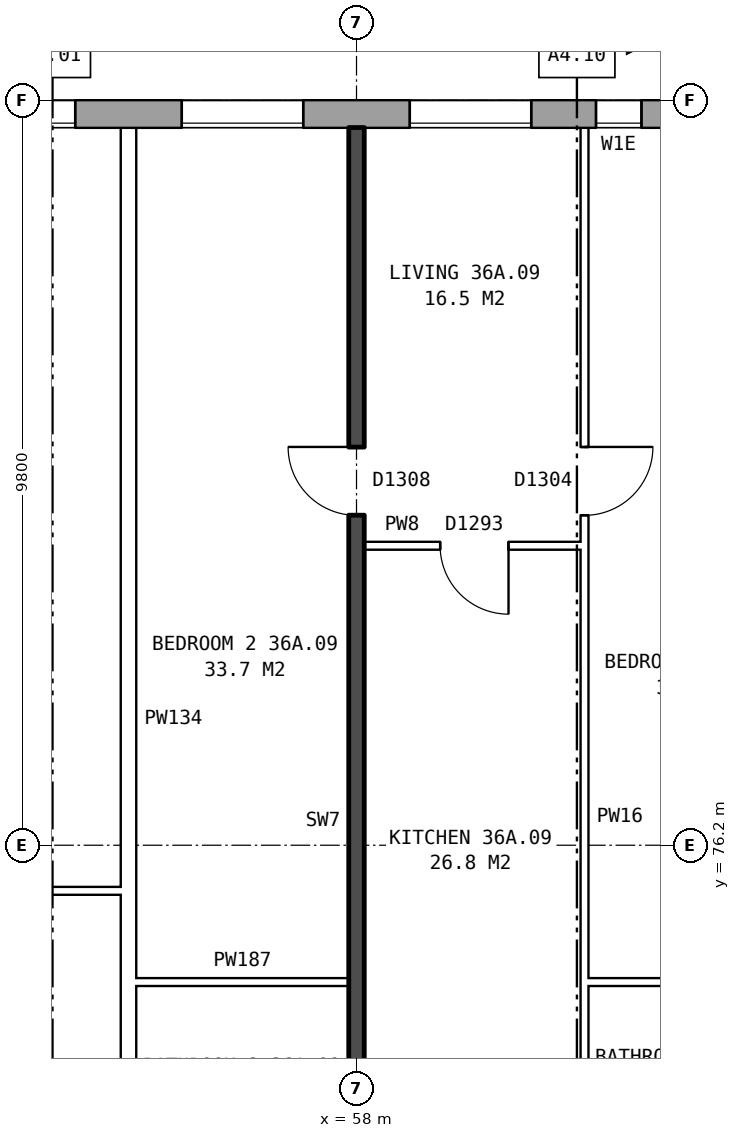
"""IFC4 building model, lengths in metres.
Left out: names, types, materials, properties, quantities, classifications, styles, units other than length and angle.
Written with IfcOpenShell. Run it as: python <this file> out.ifc"""

import sys

from ifc_helpers import new_model, si_unit, direction, frame, frame_2d, origin, place, context, subcontext, project, spatial, rectangle, extrude, element, fill, save


model = new_model("IFC4")
c1 = context("Model", 3, precision=1e-05, world=origin(), true_north=direction((0.0, 1.0)))
c2 = subcontext(c1, "Body", "Model", "MODEL_VIEW")
j1 = project(units=[si_unit("LENGTHUNIT", "METRE"), si_unit("PLANEANGLEUNIT", "RADIAN")], contexts=[c1])
p1 = place(None, origin())
s1 = spatial("IfcSite", under=j1, at=p1, CompositionType="ELEMENT")
p2 = place(p1, origin())
s2 = spatial("IfcBuilding", under=s1, at=p2, CompositionType="ELEMENT")
p3 = place(p2, frame((0.0, 0.0, 129.9)))
s3 = spatial("IfcBuildingStorey", under=s2, at=p3, CompositionType="ELEMENT", Elevation=129.9)
p4 = place(p3, frame((72.925, 85.82, 0.0), z_axis=(0.0, 0.0, 1.0), x_axis=(-1.0, 0.0, 0.0)))
e1 = element("IfcWall", 1, at=p4, inside=s3, PredefinedType="STANDARD", context=c2, shape_type="SweptSolid", body=[
    extrude(rectangle(XDim=43.101, YDim=0.36, at=frame_2d((21.55, 0.0))), origin(), (0.0, 0.0, 1.0), 2.85),
])
p5 = place(p4, frame((0.625, 0.0, 0.8)))
e2 = element("IfcOpeningElement", 2, at=p5, cuts=e1, PredefinedType="OPENING", context=c2, shape_type="SweptSolid", body=[
    extrude(rectangle(XDim=1.6, YDim=1.8, at=frame_2d((0.8, 0.9))), frame((0.0, 0.19, 0.0), z_axis=(0.0, -1.0, 0.0), x_axis=(1.0, 0.0, 0.0)), (0.0, 0.0, 1.0), 0.38),
])
p6 = place(p4, frame((3.625, 0.0, 0.8)))
e3 = element("IfcOpeningElement", 3, at=p6, cuts=e1, PredefinedType="OPENING", context=c2, shape_type="SweptSolid", body=[
    extrude(rectangle(XDim=1.6, YDim=1.8, at=frame_2d((0.8, 0.9))), frame((0.0, 0.19, 0.0), z_axis=(0.0, -1.0, 0.0), x_axis=(1.0, 0.0, 0.0)), (0.0, 0.0, 1.0), 0.38),
])
p7 = place(p4, frame((6.625, 0.0, 0.8)))
e4 = element("IfcOpeningElement", 4, at=p7, cuts=e1, PredefinedType="OPENING", context=c2, shape_type="SweptSolid", body=[
    extrude(rectangle(XDim=1.6, YDim=1.8, at=frame_2d((0.8, 0.9))), frame((0.0, 0.19, 0.0), z_axis=(0.0, -1.0, 0.0), x_axis=(1.0, 0.0, 0.0)), (0.0, 0.0, 1.0), 0.38),
])
p8 = place(p4, frame((10.175, 0.0, 0.15)))
e5 = element("IfcOpeningElement", 5, at=p8, cuts=e1, PredefinedType="OPENING", context=c2, shape_type="SweptSolid", body=[
    extrude(rectangle(XDim=0.6, YDim=0.9, at=frame_2d((0.3, 0.45))), frame((0.0, 0.19, 0.0), z_axis=(0.0, -1.0, 0.0), x_axis=(1.0, 0.0, 0.0)), (0.0, 0.0, 1.0), 0.38),
])
p9 = place(p4, frame((12.625, 0.0, 0.8)))
e6 = element("IfcOpeningElement", 6, at=p9, cuts=e1, PredefinedType="OPENING", context=c2, shape_type="SweptSolid", body=[
    extrude(rectangle(XDim=1.6, YDim=1.8, at=frame_2d((0.8, 0.9))), frame((0.0, 0.19, 0.0), z_axis=(0.0, -1.0, 0.0), x_axis=(1.0, 0.0, 0.0)), (0.0, 0.0, 1.0), 0.38),
])
p10 = place(p4, frame((15.625, 0.0, 0.8)))
e7 = element("IfcOpeningElement", 7, at=p10, cuts=e1, PredefinedType="OPENING", context=c2, shape_type="SweptSolid", body=[
    extrude(rectangle(XDim=1.6, YDim=1.8, at=frame_2d((0.8, 0.9))), frame((0.0, 0.19, 0.0), z_axis=(0.0, -1.0, 0.0), x_axis=(1.0, 0.0, 0.0)), (0.0, 0.0, 1.0), 0.38),
])
p11 = place(p4, frame((18.625, 0.0, 0.8)))
e8 = element("IfcOpeningElement", 8, at=p11, cuts=e1, PredefinedType="OPENING", context=c2, shape_type="SweptSolid", body=[
    extrude(rectangle(XDim=1.6, YDim=1.8, at=frame_2d((0.8, 0.9))), frame((0.0, 0.19, 0.0), z_axis=(0.0, -1.0, 0.0), x_axis=(1.0, 0.0, 0.0)), (0.0, 0.0, 1.0), 0.38),
])
p12 = place(p4, frame((21.625, 0.0, 0.8)))
e9 = element("IfcOpeningElement", 9, at=p12, cuts=e1, PredefinedType="OPENING", context=c2, shape_type="SweptSolid", body=[
    extrude(rectangle(XDim=1.6, YDim=1.8, at=frame_2d((0.8, 0.9))), frame((0.0, 0.19, 0.0), z_axis=(0.0, -1.0, 0.0), x_axis=(1.0, 0.0, 0.0)), (0.0, 0.0, 1.0), 0.38),
])
p13 = place(p4, frame((24.625, 0.0, 0.8)))
e10 = element("IfcOpeningElement", 10, at=p13, cuts=e1, PredefinedType="OPENING", context=c2, shape_type="SweptSolid", body=[
    extrude(rectangle(XDim=1.6, YDim=1.8, at=frame_2d((0.8, 0.9))), frame((0.0, 0.19, 0.0), z_axis=(0.0, -1.0, 0.0), x_axis=(1.0, 0.0, 0.0)), (0.0, 0.0, 1.0), 0.38),
])
p14 = place(p4, frame((27.625, 0.0, 0.8)))
e11 = element("IfcOpeningElement", 11, at=p14, cuts=e1, PredefinedType="OPENING", context=c2, shape_type="SweptSolid", body=[
    extrude(rectangle(XDim=1.6, YDim=1.8, at=frame_2d((0.8, 0.9))), frame((0.0, 0.19, 0.0), z_axis=(0.0, -1.0, 0.0), x_axis=(1.0, 0.0, 0.0)), (0.0, 0.0, 1.0), 0.38),
])
p15 = place(p4, frame((29.525, 0.0, 0.8)))
e12 = element("IfcOpeningElement", 12, at=p15, cuts=e1, PredefinedType="OPENING", context=c2, shape_type="SweptSolid", body=[
    extrude(rectangle(XDim=1.6, YDim=1.8, at=frame_2d((0.8, 0.9))), frame((0.0, 0.19, 0.0), z_axis=(0.0, -1.0, 0.0), x_axis=(1.0, 0.0, 0.0)), (0.0, 0.0, 1.0), 0.38),
])
p16 = place(p4, frame((33.375, 0.0, 1.7)))
e13 = element("IfcOpeningElement", 13, at=p16, cuts=e1, PredefinedType="OPENING", context=c2, shape_type="SweptSolid", body=[
    extrude(rectangle(XDim=0.8, YDim=0.9, at=frame_2d((0.4, 0.45))), frame((0.0, 0.19, 0.0), z_axis=(0.0, -1.0, 0.0), x_axis=(1.0, 0.0, 0.0)), (0.0, 0.0, 1.0), 0.38),
])
p17 = place(p4, frame((36.625, 0.0, 0.8)))
e14 = element("IfcOpeningElement", 14, at=p17, cuts=e1, PredefinedType="OPENING", context=c2, shape_type="SweptSolid", body=[
    extrude(rectangle(XDim=1.6, YDim=1.8, at=frame_2d((0.8, 0.9))), frame((0.0, 0.19, 0.0), z_axis=(0.0, -1.0, 0.0), x_axis=(1.0, 0.0, 0.0)), (0.0, 0.0, 1.0), 0.38),
])
p18 = place(p4, frame((39.625, 0.0, 0.8)))
e15 = element("IfcOpeningElement", 15, at=p18, cuts=e1, PredefinedType="OPENING", context=c2, shape_type="SweptSolid", body=[
    extrude(rectangle(XDim=1.6, YDim=1.8, at=frame_2d((0.8, 0.9))), frame((0.0, 0.19, 0.0), z_axis=(0.0, -1.0, 0.0), x_axis=(1.0, 0.0, 0.0)), (0.0, 0.0, 1.0), 0.38),
])
p19 = place(p4, frame((11.175, 0.0, 0.15)))
e16 = element("IfcOpeningElement", 16, at=p19, cuts=e1, PredefinedType="OPENING", context=c2, shape_type="SweptSolid", body=[
    extrude(rectangle(XDim=0.6, YDim=1.8, at=frame_2d((0.3, 0.9))), frame((0.0, 0.19, 0.0), z_axis=(0.0, -1.0, 0.0), x_axis=(1.0, 0.0, 0.0)), (0.0, 0.0, 1.0), 0.38),
])
p20 = place(p4, frame((31.425, 0.0, 0.8)))
e17 = element("IfcOpeningElement", 17, at=p20, cuts=e1, PredefinedType="OPENING", context=c2, shape_type="SweptSolid", body=[
    extrude(rectangle(XDim=0.8, YDim=0.9, at=frame_2d((0.4, 0.45))), frame((0.0, 0.19, 0.0), z_axis=(0.0, -1.0, 0.0), x_axis=(1.0, 0.0, 0.0)), (0.0, 0.0, 1.0), 0.38),
])
p21 = place(p4, frame((34.475, 0.0, 0.8)))
e18 = element("IfcOpeningElement", 18, at=p21, cuts=e1, PredefinedType="OPENING", context=c2, shape_type="SweptSolid", body=[
    extrude(rectangle(XDim=1.6, YDim=1.8, at=frame_2d((0.8, 0.9))), frame((0.0, 0.19, 0.0), z_axis=(0.0, -1.0, 0.0), x_axis=(1.0, 0.0, 0.0)), (0.0, 0.0, 1.0), 0.38),
])
p22 = place(p3, frame((55.1, 74.4, 0.0), z_axis=(0.0, 0.0, 1.0), x_axis=(1.0, 0.0, 0.0)))
e19 = element("IfcWall", 19, at=p22, inside=s3, PredefinedType="PARTITIONING", context=c2, shape_type="SweptSolid", body=[
    extrude(rectangle(XDim=2.8, YDim=0.1, at=frame_2d((1.4, 0.0))), origin(), (0.0, 0.0, 1.0), 2.85),
])
p23 = place(p3, frame((61.0, 74.4, 0.0), z_axis=(0.0, 0.0, 1.0), x_axis=(1.0, 0.0, 0.0)))
e20 = element("IfcWall", 20, at=p23, inside=s3, PredefinedType="PARTITIONING", context=c2, shape_type="SweptSolid", body=[
    extrude(rectangle(XDim=2.64, YDim=0.1, at=frame_2d((1.32, 0.0))), origin(), (0.0, 0.0, 1.0), 2.85),
])
p24 = place(p3, frame((52.1, 75.6, 0.0), z_axis=(0.0, 0.0, 1.0), x_axis=(1.0, 0.0, 0.0)))
e21 = element("IfcWall", 21, at=p24, inside=s3, PredefinedType="PARTITIONING", context=c2, shape_type="SweptSolid", body=[
    extrude(rectangle(XDim=2.8, YDim=0.1, at=frame_2d((1.4, 0.0))), origin(), (0.0, 0.0, 1.0), 2.85),
])
p25 = place(p3, frame((58.1, 80.14, 0.0), z_axis=(0.0, 0.0, 1.0), x_axis=(1.0, 0.0, 0.0)))
e22 = element("IfcWall", 22, at=p25, inside=s3, PredefinedType="PARTITIONING", context=c2, shape_type="SweptSolid", body=[
    extrude(rectangle(XDim=2.9, YDim=0.1, at=frame_2d((1.45, 0.0))), origin(), (0.0, 0.0, 1.0), 2.85),
])
p26 = place(p25, frame((1.0, 0.0, 0.0)))
e23 = element("IfcOpeningElement", 23, at=p26, cuts=e22, PredefinedType="OPENING", context=c2, shape_type="SweptSolid", body=[
    extrude(rectangle(XDim=0.9, YDim=2.1, at=frame_2d((0.45, 1.05))), frame((0.0, 0.06, 0.0), z_axis=(0.0, -1.0, 0.0), x_axis=(1.0, 0.0, 0.0)), (0.0, 0.0, 1.0), 0.12),
])
p27 = place(p3, frame((55.0, 71.3, 0.0), z_axis=(0.0, 0.0, 1.0), x_axis=(0.0, 1.0, 0.0)))
e24 = element("IfcWall", 24, at=p27, inside=s3, PredefinedType="PARTITIONING", context=c2, shape_type="SweptSolid", body=[
    extrude(rectangle(XDim=14.34, YDim=0.2, at=frame_2d((7.17, 0.0))), origin(), (0.0, 0.0, 1.0), 2.85),
])
p28 = place(p3, frame((58.0, 71.2, 0.0), z_axis=(0.0, 0.0, 1.0), x_axis=(0.0, 1.0, 0.0)))
e25 = element("IfcWall", 25, at=p28, inside=s3, PredefinedType="SOLIDWALL", context=c2, shape_type="SweptSolid", body=[
    extrude(rectangle(XDim=14.44, YDim=0.2, at=frame_2d((7.22, 0.0))), origin(), (0.0, 0.0, 1.0), 2.85),
])
p29 = place(p28, frame((9.34, 0.0, 0.0)))
e26 = element("IfcOpeningElement", 26, at=p29, cuts=e25, PredefinedType="OPENING", context=c2, shape_type="SweptSolid", body=[
    extrude(rectangle(XDim=0.9, YDim=2.1, at=frame_2d((0.45, 1.05))), frame((0.0, 0.11, 0.0), z_axis=(0.0, -1.0, 0.0), x_axis=(1.0, 0.0, 0.0)), (0.0, 0.0, 1.0), 0.22),
])
p30 = place(p28, frame((0.4, 0.0, 0.0)))
e27 = element("IfcOpeningElement", 27, at=p30, cuts=e25, PredefinedType="OPENING", context=c2, shape_type="SweptSolid", body=[
    extrude(rectangle(XDim=0.9, YDim=2.1, at=frame_2d((0.45, 1.05))), frame((0.0, 0.11, 0.0), z_axis=(0.0, -1.0, 0.0), x_axis=(1.0, 0.0, 0.0)), (0.0, 0.0, 1.0), 0.22),
])
p31 = place(p3, frame((61.0, 71.3, 0.0), z_axis=(0.0, 0.0, 1.0), x_axis=(0.0, 1.0, 0.0)))
e28 = element("IfcWall", 28, at=p31, inside=s3, PredefinedType="PARTITIONING", context=c2, shape_type="SweptSolid", body=[
    extrude(rectangle(XDim=14.34, YDim=0.1, at=frame_2d((7.17, 0.0))), origin(), (0.0, 0.0, 1.0), 2.85),
])
p32 = place(p31, frame((9.24, 0.0, 0.0)))
e29 = element("IfcOpeningElement", 29, at=p32, cuts=e28, PredefinedType="OPENING", context=c2, shape_type="SweptSolid", body=[
    extrude(rectangle(XDim=0.9, YDim=2.1, at=frame_2d((0.45, 1.05))), frame((0.0, 0.06, 0.0), z_axis=(0.0, -1.0, 0.0), x_axis=(1.0, 0.0, 0.0)), (0.0, 0.0, 1.0), 0.12),
])
p33 = place(p31, frame((0.4, 0.0, 0.0)))
e30 = element("IfcOpeningElement", 30, at=p33, cuts=e28, PredefinedType="OPENING", context=c2, shape_type="SweptSolid", body=[
    extrude(rectangle(XDim=0.9, YDim=2.1, at=frame_2d((0.45, 1.05))), frame((0.0, 0.06, 0.0), z_axis=(0.0, -1.0, 0.0), x_axis=(1.0, 0.0, 0.0)), (0.0, 0.0, 1.0), 0.12),
])
p34 = place(p9, origin())
e31 = element("IfcWindow", 31, at=p34, inside=s3, PartitioningType="SINGLE_PANEL", PredefinedType="WINDOW", context=c2, shape_type="SweptSolid", body=[
    extrude(rectangle(XDim=1.6, YDim=1.8, at=frame_2d((0.8, 0.9))), frame((0.0, 0.15, 0.0), z_axis=(0.0, -1.0, 0.0), x_axis=(1.0, 0.0, 0.0)), (0.0, 0.0, 1.0), 0.06),
])
fill(e6, e31)
p35 = place(p10, origin())
e32 = element("IfcWindow", 32, at=p35, inside=s3, PartitioningType="SINGLE_PANEL", PredefinedType="WINDOW", context=c2, shape_type="SweptSolid", body=[
    extrude(rectangle(XDim=1.6, YDim=1.8, at=frame_2d((0.8, 0.9))), frame((0.0, 0.15, 0.0), z_axis=(0.0, -1.0, 0.0), x_axis=(1.0, 0.0, 0.0)), (0.0, 0.0, 1.0), 0.06),
])
fill(e7, e32)
p36 = place(p11, origin())
e33 = element("IfcWindow", 33, at=p36, inside=s3, PartitioningType="SINGLE_PANEL", PredefinedType="WINDOW", context=c2, shape_type="SweptSolid", body=[
    extrude(rectangle(XDim=1.6, YDim=1.8, at=frame_2d((0.8, 0.9))), frame((0.0, 0.15, 0.0), z_axis=(0.0, -1.0, 0.0), x_axis=(1.0, 0.0, 0.0)), (0.0, 0.0, 1.0), 0.06),
])
fill(e8, e33)
p37 = place(p32, frame((0.9, 0.0, 0.0), z_axis=(0.0, 0.0, 1.0), x_axis=(-1.0, 0.0, 0.0)))
e34 = element("IfcDoor", 34, at=p37, inside=s3, OperationType="SINGLE_SWING_LEFT", PredefinedType="DOOR", context=c2, shape_type="SweptSolid", body=[
    extrude(rectangle(XDim=0.9, YDim=2.1, at=frame_2d((0.45, 1.05))), frame((0.0, 0.025, 0.0), z_axis=(0.0, -1.0, 0.0), x_axis=(1.0, 0.0, 0.0)), (0.0, 0.0, 1.0), 0.05),
])
fill(e29, e34)
p38 = place(p29, origin())
e35 = element("IfcDoor", 35, at=p38, inside=s3, OperationType="SINGLE_SWING_RIGHT", PredefinedType="DOOR", context=c2, shape_type="SweptSolid", body=[
    extrude(rectangle(XDim=0.9, YDim=2.1, at=frame_2d((0.45, 1.05))), frame((0.0, 0.025, 0.0), z_axis=(0.0, -1.0, 0.0), x_axis=(1.0, 0.0, 0.0)), (0.0, 0.0, 1.0), 0.05),
])
fill(e26, e35)
p39 = place(p26, frame((0.9, 0.0, 0.0), z_axis=(0.0, 0.0, 1.0), x_axis=(-1.0, 0.0, 0.0)))
e36 = element("IfcDoor", 36, at=p39, inside=s3, OperationType="SINGLE_SWING_LEFT", PredefinedType="DOOR", context=c2, shape_type="SweptSolid", body=[
    extrude(rectangle(XDim=0.9, YDim=2.1, at=frame_2d((0.45, 1.05))), frame((0.0, 0.025, 0.0), z_axis=(0.0, -1.0, 0.0), x_axis=(1.0, 0.0, 0.0)), (0.0, 0.0, 1.0), 0.05),
])
fill(e23, e36)
p40 = place(p19, origin())
e37 = element("IfcWindow", 37, at=p40, inside=s3, PartitioningType="SINGLE_PANEL", PredefinedType="WINDOW", context=c2, shape_type="SweptSolid", body=[
    extrude(rectangle(XDim=0.6, YDim=1.8, at=frame_2d((0.3, 0.9))), frame((0.0, 0.15, 0.0), z_axis=(0.0, -1.0, 0.0), x_axis=(1.0, 0.0, 0.0)), (0.0, 0.0, 1.0), 0.06),
])
fill(e16, e37)
save(model, sys.argv[1])
